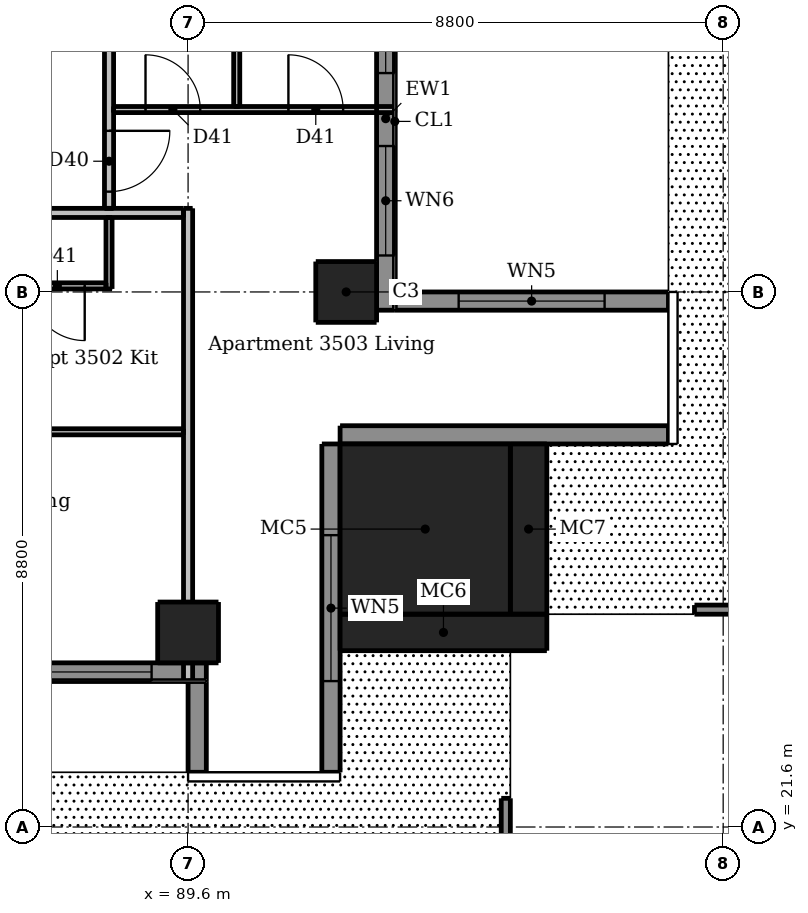
"""IFC4 building model, lengths in metres.
Left out: names, types, materials, properties, quantities, classifications, styles, units other than length and angle.
Written with IfcOpenShell. Run it as: python <this file> out.ifc"""

import sys

from ifc_helpers import new_model, si_unit, direction, frame, frame_2d, origin, origin_2d, place, context, subcontext, project, spatial, rectangle, extrude, element, fill, save


model = new_model("IFC4")
c1 = context("Model", 3, precision=1e-05, world=origin(), true_north=direction((0.0, 1.0)))
c2 = subcontext(c1, "Body", "Model", "MODEL_VIEW")
j1 = project(units=[si_unit("LENGTHUNIT", "METRE"), si_unit("PLANEANGLEUNIT", "RADIAN")], contexts=[c1])
p1 = place(None, origin())
s1 = spatial("IfcSite", under=j1, at=p1, CompositionType="ELEMENT")
p2 = place(p1, origin())
s2 = spatial("IfcBuilding", under=s1, at=p2, CompositionType="ELEMENT")
p3 = place(p2, frame((0.0, 0.0, 133.9)))
s3 = spatial("IfcBuildingStorey", under=s2, at=p3, CompositionType="ELEMENT", Elevation=133.9)
for number, where, z_axis, x_axis in (
    (1, (89.6, 24.8, 0.0), (0.0, 0.0, 1.0), (1.0, 0.0, 0.0)),
    (2, (92.2, 30.4, 0.0), (0.0, 0.0, 1.0), (1.0, 0.0, 0.0)),
):
    element("IfcColumn", number, at=place(p3, frame(where, z_axis=z_axis, x_axis=x_axis)), inside=s3, PredefinedType="COLUMN", context=c2, shape_type="SweptSolid", body=[
        extrude(rectangle(XDim=1.0, YDim=1.0, at=origin_2d()), origin(), (0.0, 0.0, 1.0), 3.05),
    ])
p4 = place(p3, frame((93.8, 24.8, 0.0), z_axis=(0.0, 0.0, 1.0), x_axis=(1.0, 0.0, 0.0)))
e3 = element("IfcColumn", 3, at=p4, inside=s3, PredefinedType="COLUMN", context=c2, shape_type="SweptSolid", body=[
    extrude(rectangle(XDim=3.4, YDim=0.6, at=origin_2d()), origin(), (0.0, 0.0, 1.0), 2.4),
])
p5 = place(p3, frame((95.2, 26.5, 0.0), z_axis=(0.0, 0.0, 1.0), x_axis=(1.0, 0.0, 0.0)))
e4 = element("IfcColumn", 4, at=p5, inside=s3, PredefinedType="COLUMN", context=c2, shape_type="SweptSolid", body=[
    extrude(rectangle(XDim=0.6, YDim=2.8, at=origin_2d()), origin(), (0.0, 0.0, 1.0), 2.4),
])
p6 = place(p3, frame((93.5, 26.5, 0.0), z_axis=(0.0, 0.0, 1.0), x_axis=(1.0, 0.0, 0.0)))
e5 = element("IfcColumn", 5, at=p6, inside=s3, PredefinedType="COLUMN", context=c2, shape_type="SweptSolid", body=[
    extrude(rectangle(XDim=2.8, YDim=2.8, at=origin_2d()), origin(), (0.0, 0.0, 1.0), 3.3),
])
p7 = place(p3, frame((89.75, 24.0, 0.0), z_axis=(0.0, 0.0, 1.0), x_axis=(0.0, -1.0, 0.0)))
e6 = element("IfcWall", 6, at=p7, inside=s3, PredefinedType="SOLIDWALL", context=c2, shape_type="SweptSolid", body=[
    extrude(rectangle(XDim=1.5, YDim=0.3, at=frame_2d((0.75, 0.0))), origin(), (0.0, 0.0, 1.0), 3.05),
])
p8 = place(p3, frame((91.95, 22.5, 0.0), z_axis=(0.0, 0.0, 1.0), x_axis=(0.0, 1.0, 0.0)))
e7 = element("IfcWall", 7, at=p8, inside=s3, PredefinedType="SOLIDWALL", context=c2, shape_type="SweptSolid", body=[
    extrude(rectangle(XDim=5.4, YDim=0.3, at=frame_2d((2.7, 0.0))), origin(), (0.0, 0.0, 1.0), 3.05),
])
p9 = place(p8, frame((1.5, 0.0, 0.15)))
e8 = element("IfcOpeningElement", 8, at=p9, cuts=e7, PredefinedType="OPENING", context=c2, shape_type="SweptSolid", body=[
    extrude(rectangle(XDim=2.4, YDim=2.1, at=frame_2d((1.2, 1.05))), frame((0.0, 0.16, 0.0), z_axis=(0.0, -1.0, 0.0), x_axis=(1.0, 0.0, 0.0)), (0.0, 0.0, 1.0), 0.32),
])
p10 = place(p3, frame((92.1, 28.05, 0.0), z_axis=(0.0, 0.0, 1.0), x_axis=(1.0, 0.0, 0.0)))
e9 = element("IfcWall", 9, at=p10, inside=s3, PredefinedType="SOLIDWALL", context=c2, shape_type="SweptSolid", body=[
    extrude(rectangle(XDim=5.4, YDim=0.3, at=frame_2d((2.7, 0.0))), origin(), (0.0, 0.0, 1.0), 3.05),
])
p11 = place(p3, frame((97.5, 30.25, 0.0), z_axis=(0.0, 0.0, 1.0), x_axis=(-1.0, 0.0, 0.0)))
e10 = element("IfcWall", 10, at=p11, inside=s3, PredefinedType="SOLIDWALL", context=c2, shape_type="SweptSolid", body=[
    extrude(rectangle(XDim=4.5, YDim=0.3, at=frame_2d((2.25, 0.0))), origin(), (0.0, 0.0, 1.0), 3.05),
])
p12 = place(p11, frame((1.05, 0.0, 0.15)))
e11 = element("IfcOpeningElement", 11, at=p12, cuts=e10, PredefinedType="OPENING", context=c2, shape_type="SweptSolid", body=[
    extrude(rectangle(XDim=2.4, YDim=2.1, at=frame_2d((1.2, 1.05))), frame((0.0, 0.16, 0.0), z_axis=(0.0, -1.0, 0.0), x_axis=(1.0, 0.0, 0.0)), (0.0, 0.0, 1.0), 0.32),
])
p13 = place(p3, frame((83.6, 24.15, 0.0), z_axis=(0.0, 0.0, 1.0), x_axis=(1.0, 0.0, 0.0)))
e12 = element("IfcWall", 12, at=p13, inside=s3, PredefinedType="SOLIDWALL", context=c2, shape_type="SweptSolid", body=[
    extrude(rectangle(XDim=6.3, YDim=0.3, at=frame_2d((3.15, 0.0))), origin(), (0.0, 0.0, 1.0), 3.05),
])
p14 = place(p13, frame((0.6, 0.0, 0.15)))
e13 = element("IfcOpeningElement", 13, at=p14, cuts=e12, PredefinedType="OPENING", context=c2, shape_type="SweptSolid", body=[
    extrude(rectangle(XDim=1.8, YDim=2.1, at=frame_2d((0.9, 1.05))), frame((0.0, 0.16, 0.0), z_axis=(0.0, -1.0, 0.0), x_axis=(1.0, 0.0, 0.0)), (0.0, 0.0, 1.0), 0.32),
])
p15 = place(p13, frame((3.6, 0.0, 0.15)))
e14 = element("IfcOpeningElement", 14, at=p15, cuts=e12, PredefinedType="OPENING", context=c2, shape_type="SweptSolid", body=[
    extrude(rectangle(XDim=1.8, YDim=2.1, at=frame_2d((0.9, 1.05))), frame((0.0, 0.16, 0.0), z_axis=(0.0, -1.0, 0.0), x_axis=(1.0, 0.0, 0.0)), (0.0, 0.0, 1.0), 0.32),
])
p16 = place(p3, frame((92.85, 30.1, 0.0), z_axis=(0.0, 0.0, 1.0), x_axis=(0.0, 1.0, 0.0)))
e15 = element("IfcWall", 15, at=p16, inside=s3, PredefinedType="SOLIDWALL", context=c2, shape_type="SweptSolid", body=[
    extrude(rectangle(XDim=6.3, YDim=0.3, at=frame_2d((3.15, 0.0))), origin(), (0.0, 0.0, 1.0), 3.05),
])
p17 = place(p16, frame((0.9, 0.0, 0.15)))
e16 = element("IfcOpeningElement", 16, at=p17, cuts=e15, PredefinedType="OPENING", context=c2, shape_type="SweptSolid", body=[
    extrude(rectangle(XDim=1.8, YDim=2.1, at=frame_2d((0.9, 1.05))), frame((0.0, 0.16, 0.0), z_axis=(0.0, -1.0, 0.0), x_axis=(1.0, 0.0, 0.0)), (0.0, 0.0, 1.0), 0.32),
])
p18 = place(p16, frame((3.9, 0.0, 0.15)))
e17 = element("IfcOpeningElement", 17, at=p18, cuts=e15, PredefinedType="OPENING", context=c2, shape_type="SweptSolid", body=[
    extrude(rectangle(XDim=1.8, YDim=2.1, at=frame_2d((0.9, 1.05))), frame((0.0, 0.16, 0.0), z_axis=(0.0, -1.0, 0.0), x_axis=(1.0, 0.0, 0.0)), (0.0, 0.0, 1.0), 0.32),
])
p19 = place(p3, frame((94.825, 20.15, 0.0), z_axis=(0.0, 0.0, 1.0), x_axis=(0.0, 1.0, 0.0)))
e18 = element("IfcWall", 18, at=p19, inside=s3, PredefinedType="PARAPET", context=c2, shape_type="SweptSolid", body=[
    extrude(rectangle(XDim=1.922, YDim=0.15, at=frame_2d((0.961, 0.0))), origin(), (0.0, 0.0, 1.0), 1.1),
])
p20 = place(p3, frame((97.928, 25.175, 0.0), z_axis=(0.0, 0.0, 1.0), x_axis=(1.0, 0.0, 0.0)))
e19 = element("IfcWall", 19, at=p20, inside=s3, PredefinedType="PARAPET", context=c2, shape_type="SweptSolid", body=[
    extrude(rectangle(XDim=2.072, YDim=0.15, at=frame_2d((1.036, 0.0))), origin(), (0.0, 0.0, 1.0), 1.1),
])
p21 = place(p3, frame((88.3, 30.45, 0.0), z_axis=(0.0, 0.0, 1.0), x_axis=(0.0, 1.0, 0.0)))
e20 = element("IfcWall", 20, at=p21, inside=s3, PredefinedType="PARTITIONING", context=c2, shape_type="SweptSolid", body=[
    extrude(rectangle(XDim=1.175, YDim=0.1, at=frame_2d((0.587, 0.0))), origin(), (0.0, 0.0, 1.0), 3.05),
])
p22 = place(p3, frame((90.4, 33.45, 0.0), z_axis=(0.0, 0.0, 1.0), x_axis=(0.0, 1.0, 0.0)))
e21 = element("IfcWall", 21, at=p22, inside=s3, PredefinedType="PARTITIONING", context=c2, shape_type="SweptSolid", body=[
    extrude(rectangle(XDim=5.975, YDim=0.1, at=frame_2d((2.988, 0.0))), origin(), (0.0, 0.0, 1.0), 3.05),
])
p23 = place(p22, frame((3.8, 0.0, 0.0)))
e22 = element("IfcOpeningElement", 22, at=p23, cuts=e21, PredefinedType="OPENING", context=c2, shape_type="SweptSolid", body=[
    extrude(rectangle(XDim=0.8, YDim=2.1, at=frame_2d((0.4, 1.05))), frame((0.0, 0.06, 0.0), z_axis=(0.0, -1.0, 0.0), x_axis=(1.0, 0.0, 0.0)), (0.0, 0.0, 1.0), 0.12),
])
p24 = place(p3, frame((88.375, 33.4, 0.0), z_axis=(0.0, 0.0, 1.0), x_axis=(1.0, 0.0, 0.0)))
e23 = element("IfcWall", 23, at=p24, inside=s3, PredefinedType="PARTITIONING", context=c2, shape_type="SweptSolid", body=[
    extrude(rectangle(XDim=4.625, YDim=0.1, at=frame_2d((2.312, 0.0))), origin(), (0.0, 0.0, 1.0), 3.05),
])
p25 = place(p24, frame((0.525, 0.0, 0.0)))
e24 = element("IfcOpeningElement", 24, at=p25, cuts=e23, PredefinedType="OPENING", context=c2, shape_type="SweptSolid", body=[
    extrude(rectangle(XDim=0.9, YDim=2.1, at=frame_2d((0.45, 1.05))), frame((0.0, 0.06, 0.0), z_axis=(0.0, -1.0, 0.0), x_axis=(1.0, 0.0, 0.0)), (0.0, 0.0, 1.0), 0.12),
])
p26 = place(p24, frame((2.875, 0.0, 0.0)))
e25 = element("IfcOpeningElement", 25, at=p26, cuts=e23, PredefinedType="OPENING", context=c2, shape_type="SweptSolid", body=[
    extrude(rectangle(XDim=0.9, YDim=2.1, at=frame_2d((0.45, 1.05))), frame((0.0, 0.06, 0.0), z_axis=(0.0, -1.0, 0.0), x_axis=(1.0, 0.0, 0.0)), (0.0, 0.0, 1.0), 0.12),
])
p27 = place(p3, frame((88.25, 30.5, 0.0), z_axis=(0.0, 0.0, 1.0), x_axis=(-1.0, 0.0, 0.0)))
e26 = element("IfcWall", 26, at=p27, inside=s3, PredefinedType="PARTITIONING", context=c2, shape_type="SweptSolid", body=[
    extrude(rectangle(XDim=16.575, YDim=0.1, at=frame_2d((8.288, 0.0))), origin(), (0.0, 0.0, 1.0), 3.05),
])
p28 = place(p27, frame((4.2, 0.0, 0.0)))
e27 = element("IfcOpeningElement", 27, at=p28, cuts=e26, PredefinedType="OPENING", context=c2, shape_type="SweptSolid", body=[
    extrude(rectangle(XDim=0.9, YDim=2.1, at=frame_2d((0.45, 1.05))), frame((0.0, 0.06, 0.0), z_axis=(0.0, -1.0, 0.0), x_axis=(1.0, 0.0, 0.0)), (0.0, 0.0, 1.0), 0.12),
])
p29 = place(p27, frame((0.35, 0.0, 0.0)))
e28 = element("IfcOpeningElement", 28, at=p29, cuts=e26, PredefinedType="OPENING", context=c2, shape_type="SweptSolid", body=[
    extrude(rectangle(XDim=0.9, YDim=2.1, at=frame_2d((0.45, 1.05))), frame((0.0, 0.06, 0.0), z_axis=(0.0, -1.0, 0.0), x_axis=(1.0, 0.0, 0.0)), (0.0, 0.0, 1.0), 0.12),
])
p30 = place(p27, frame((14.65, 0.0, 0.0)))
e29 = element("IfcOpeningElement", 29, at=p30, cuts=e26, PredefinedType="OPENING", context=c2, shape_type="SweptSolid", body=[
    extrude(rectangle(XDim=0.9, YDim=2.1, at=frame_2d((0.45, 1.05))), frame((0.0, 0.06, 0.0), z_axis=(0.0, -1.0, 0.0), x_axis=(1.0, 0.0, 0.0)), (0.0, 0.0, 1.0), 0.12),
])
p31 = place(p27, frame((11.35, 0.0, 0.0)))
e30 = element("IfcOpeningElement", 30, at=p31, cuts=e26, PredefinedType="OPENING", context=c2, shape_type="SweptSolid", body=[
    extrude(rectangle(XDim=0.9, YDim=2.1, at=frame_2d((0.45, 1.05))), frame((0.0, 0.06, 0.0), z_axis=(0.0, -1.0, 0.0), x_axis=(1.0, 0.0, 0.0)), (0.0, 0.0, 1.0), 0.12),
])
p32 = place(p27, frame((8.45, 0.0, 0.0)))
e31 = element("IfcOpeningElement", 31, at=p32, cuts=e26, PredefinedType="OPENING", context=c2, shape_type="SweptSolid", body=[
    extrude(rectangle(XDim=0.8, YDim=2.1, at=frame_2d((0.4, 1.05))), frame((0.0, 0.06, 0.0), z_axis=(0.0, -1.0, 0.0), x_axis=(1.0, 0.0, 0.0)), (0.0, 0.0, 1.0), 0.12),
])
p33 = place(p3, frame((86.65, 28.1, 0.0), z_axis=(0.0, 0.0, 1.0), x_axis=(1.0, 0.0, 0.0)))
e32 = element("IfcWall", 32, at=p33, inside=s3, PredefinedType="PARTITIONING", context=c2, shape_type="SweptSolid", body=[
    extrude(rectangle(XDim=2.875, YDim=0.1, at=frame_2d((1.438, 0.0))), origin(), (0.0, 0.0, 1.0), 3.05),
])
p34 = place(p3, frame((88.3, 60.475, 0.0), z_axis=(0.0, 0.0, 1.0), x_axis=(0.0, -1.0, 0.0)))
e33 = element("IfcWall", 33, at=p34, inside=s3, PredefinedType="PARTITIONING", context=c2, shape_type="SweptSolid", body=[
    extrude(rectangle(XDim=28.7, YDim=0.15, at=frame_2d((14.35, 0.0))), origin(), (0.0, 0.0, 1.0), 3.05),
])
p35 = place(p34, frame((27.425, 0.0, 0.0)))
e34 = element("IfcOpeningElement", 34, at=p35, cuts=e33, PredefinedType="OPENING", context=c2, shape_type="SweptSolid", body=[
    extrude(rectangle(XDim=1.0, YDim=2.1, at=frame_2d((0.5, 1.05))), frame((0.0, 0.085, 0.0), z_axis=(0.0, -1.0, 0.0), x_axis=(1.0, 0.0, 0.0)), (0.0, 0.0, 1.0), 0.17),
])
p36 = place(p34, frame((10.575, 0.0, 0.0)))
e35 = element("IfcOpeningElement", 35, at=p36, cuts=e33, PredefinedType="OPENING", context=c2, shape_type="SweptSolid", body=[
    extrude(rectangle(XDim=1.0, YDim=2.1, at=frame_2d((0.5, 1.05))), frame((0.0, 0.085, 0.0), z_axis=(0.0, -1.0, 0.0), x_axis=(1.0, 0.0, 0.0)), (0.0, 0.0, 1.0), 0.17),
])
p37 = place(p3, frame((89.6, 24.0, 0.0), z_axis=(0.0, 0.0, 1.0), x_axis=(0.0, 1.0, 0.0)))
e36 = element("IfcWall", 36, at=p37, inside=s3, PredefinedType="PARTITIONING", context=c2, shape_type="SweptSolid", body=[
    extrude(rectangle(XDim=7.775, YDim=0.15, at=frame_2d((3.887, 0.0))), origin(), (0.0, 0.0, 1.0), 2.51),
])
p38 = place(p3, frame((89.525, 31.7, 0.0), z_axis=(0.0, 0.0, 1.0), x_axis=(-1.0, 0.0, 0.0)))
e37 = element("IfcWall", 37, at=p38, inside=s3, PredefinedType="PARTITIONING", context=c2, shape_type="SweptSolid", body=[
    extrude(rectangle(XDim=28.75, YDim=0.15, at=frame_2d((14.375, 0.0))), origin(), (0.0, 0.0, 1.0), 3.05),
])
p39 = place(p38, frame((25.875, 0.0, 0.0)))
e38 = element("IfcOpeningElement", 38, at=p39, cuts=e37, PredefinedType="OPENING", context=c2, shape_type="SweptSolid", body=[
    extrude(rectangle(XDim=1.0, YDim=2.1, at=frame_2d((0.5, 1.05))), frame((0.0, 0.085, 0.0), z_axis=(0.0, -1.0, 0.0), x_axis=(1.0, 0.0, 0.0)), (0.0, 0.0, 1.0), 0.17),
])
p40 = place(p38, frame((9.075, 0.0, 0.0)))
e39 = element("IfcOpeningElement", 39, at=p40, cuts=e37, PredefinedType="OPENING", context=c2, shape_type="SweptSolid", body=[
    extrude(rectangle(XDim=1.0, YDim=2.1, at=frame_2d((0.5, 1.05))), frame((0.0, 0.085, 0.0), z_axis=(0.0, -1.0, 0.0), x_axis=(1.0, 0.0, 0.0)), (0.0, 0.0, 1.0), 0.17),
])
p41 = place(p9, origin())
e40 = element("IfcWindow", 40, at=p41, inside=s3, PartitioningType="DOUBLE_PANEL_VERTICAL", PredefinedType="WINDOW", context=c2, shape_type="SweptSolid", body=[
    extrude(rectangle(XDim=2.4, YDim=2.1, at=frame_2d((1.2, 1.05))), frame((0.0, 0.03, 0.0), z_axis=(0.0, -1.0, 0.0), x_axis=(1.0, 0.0, 0.0)), (0.0, 0.0, 1.0), 0.06),
])
fill(e8, e40)
p42 = place(p12, origin())
e41 = element("IfcWindow", 41, at=p42, inside=s3, PartitioningType="DOUBLE_PANEL_VERTICAL", PredefinedType="WINDOW", context=c2, shape_type="SweptSolid", body=[
    extrude(rectangle(XDim=2.4, YDim=2.1, at=frame_2d((1.2, 1.05))), frame((0.0, 0.03, 0.0), z_axis=(0.0, -1.0, 0.0), x_axis=(1.0, 0.0, 0.0)), (0.0, 0.0, 1.0), 0.06),
])
fill(e11, e41)
p43 = place(p15, origin())
e42 = element("IfcWindow", 42, at=p43, inside=s3, PartitioningType="DOUBLE_PANEL_VERTICAL", PredefinedType="WINDOW", context=c2, shape_type="SweptSolid", body=[
    extrude(rectangle(XDim=1.8, YDim=2.1, at=frame_2d((0.9, 1.05))), frame((0.0, 0.03, 0.0), z_axis=(0.0, -1.0, 0.0), x_axis=(1.0, 0.0, 0.0)), (0.0, 0.0, 1.0), 0.06),
])
fill(e14, e42)
p44 = place(p17, origin())
e43 = element("IfcWindow", 43, at=p44, inside=s3, PartitioningType="DOUBLE_PANEL_VERTICAL", PredefinedType="WINDOW", context=c2, shape_type="SweptSolid", body=[
    extrude(rectangle(XDim=1.8, YDim=2.1, at=frame_2d((0.9, 1.05))), frame((0.0, 0.03, 0.0), z_axis=(0.0, -1.0, 0.0), x_axis=(1.0, 0.0, 0.0)), (0.0, 0.0, 1.0), 0.06),
])
fill(e16, e43)
p45 = place(p18, origin())
e44 = element("IfcWindow", 44, at=p45, inside=s3, PartitioningType="DOUBLE_PANEL_VERTICAL", PredefinedType="WINDOW", context=c2, shape_type="SweptSolid", body=[
    extrude(rectangle(XDim=1.8, YDim=2.1, at=frame_2d((0.9, 1.05))), frame((0.0, 0.03, 0.0), z_axis=(0.0, -1.0, 0.0), x_axis=(1.0, 0.0, 0.0)), (0.0, 0.0, 1.0), 0.06),
])
fill(e17, e44)
p46 = place(p29, origin())
e45 = element("IfcDoor", 45, at=p46, inside=s3, OperationType="SINGLE_SWING_LEFT", PredefinedType="DOOR", context=c2, shape_type="SweptSolid", body=[
    extrude(rectangle(XDim=0.9, YDim=2.1, at=frame_2d((0.45, 1.05))), frame((0.0, 0.025, 0.0), z_axis=(0.0, -1.0, 0.0), x_axis=(1.0, 0.0, 0.0)), (0.0, 0.0, 1.0), 0.05),
])
fill(e28, e45)
p47 = place(p35, origin())
e46 = element("IfcDoor", 46, at=p47, inside=s3, OperationType="SINGLE_SWING_LEFT", PredefinedType="DOOR", context=c2, shape_type="SweptSolid", body=[
    extrude(rectangle(XDim=1.0, YDim=2.1, at=frame_2d((0.5, 1.05))), frame((0.0, 0.025, 0.0), z_axis=(0.0, -1.0, 0.0), x_axis=(1.0, 0.0, 0.0)), (0.0, 0.0, 1.0), 0.05),
])
fill(e34, e46)
p48 = place(p25, origin())
e47 = element("IfcDoor", 47, at=p48, inside=s3, OperationType="SINGLE_SWING_LEFT", PredefinedType="DOOR", context=c2, shape_type="SweptSolid", body=[
    extrude(rectangle(XDim=0.9, YDim=2.1, at=frame_2d((0.45, 1.05))), frame((0.0, 0.025, 0.0), z_axis=(0.0, -1.0, 0.0), x_axis=(1.0, 0.0, 0.0)), (0.0, 0.0, 1.0), 0.05),
])
fill(e24, e47)
p49 = place(p26, origin())
e48 = element("IfcDoor", 48, at=p49, inside=s3, OperationType="SINGLE_SWING_LEFT", PredefinedType="DOOR", context=c2, shape_type="SweptSolid", body=[
    extrude(rectangle(XDim=0.9, YDim=2.1, at=frame_2d((0.45, 1.05))), frame((0.0, 0.025, 0.0), z_axis=(0.0, -1.0, 0.0), x_axis=(1.0, 0.0, 0.0)), (0.0, 0.0, 1.0), 0.05),
])
fill(e25, e48)
save(model, sys.argv[1])
